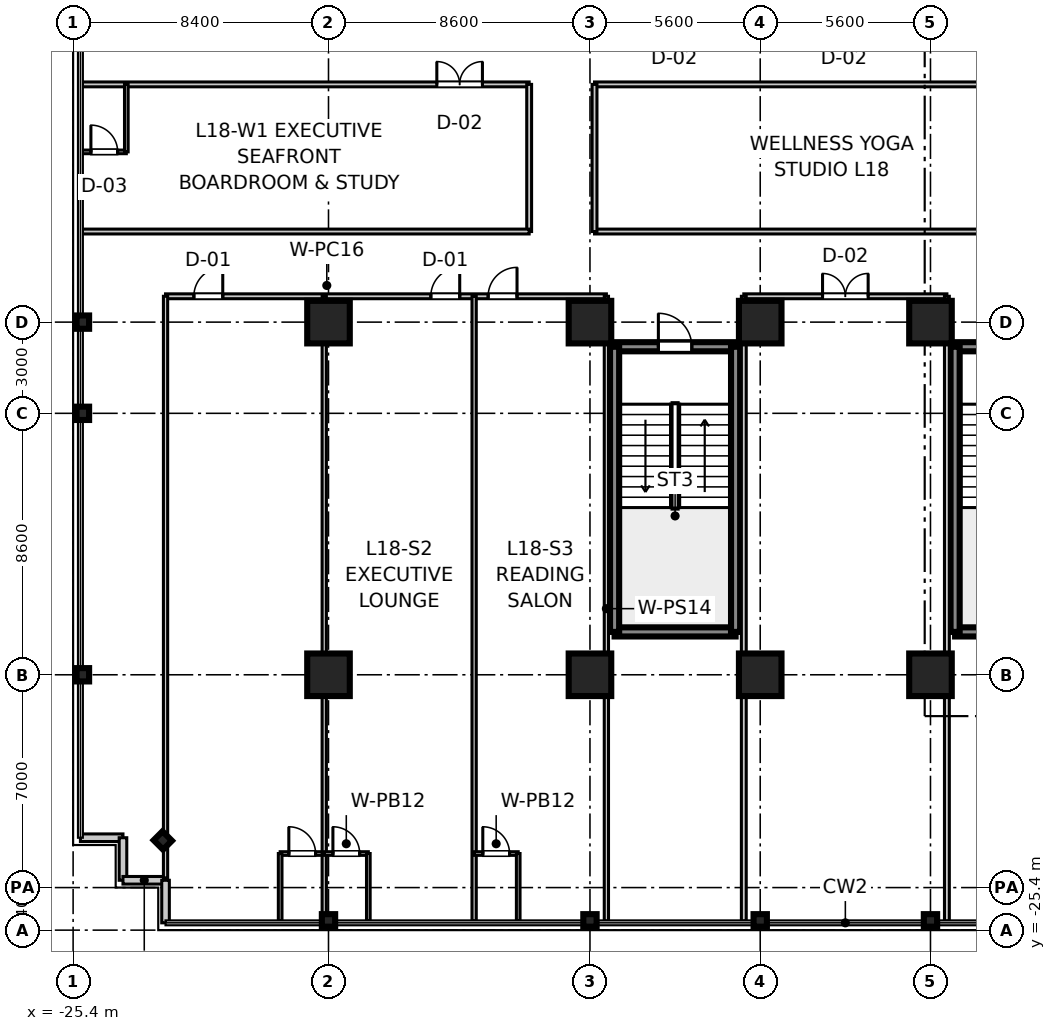
"""IFC4 building model, lengths in metres.
Left out: names, types, materials, properties, quantities, classifications, styles, units other than length and angle.
Written with IfcOpenShell. Run it as: python <this file> out.ifc"""

import sys

from ifc_helpers import new_model, si_unit, direction, frame, frame_2d, origin, origin_2d, place, context, subcontext, project, spatial, rectangle, i_section, extrude, source, transform, mapped, element, fill, save


model = new_model("IFC4")
c1 = context("Model", 3, precision=1e-05, world=origin(), true_north=direction((0.0, 1.0)))
c2 = subcontext(c1, "Body", "Model", "MODEL_VIEW")
j1 = project(units=[si_unit("LENGTHUNIT", "METRE"), si_unit("PLANEANGLEUNIT", "RADIAN")], contexts=[c1])
p1 = place(None, origin())
s1 = spatial("IfcSite", under=j1, at=p1, CompositionType="ELEMENT")
p2 = place(p1, origin())
s2 = spatial("IfcBuilding", under=s1, at=p2, CompositionType="ELEMENT")
p3 = place(p2, frame((0.0, 0.0, 76.2)))
s3 = spatial("IfcBuildingStorey", under=s2, at=p3, CompositionType="ELEMENT", Elevation=76.2)
m1 = source(origin(), c2, "Body", "SweptSolid", [
    extrude(rectangle(XDim=1.4, YDim=1.4, at=origin_2d()), origin(), (0.0, 0.0, 1.0), 3.605),
])
for number, where, z_axis, x_axis in (
    (1, (-17.0, -17.0, 0.0), (0.0, 0.0, 1.0), (1.0, 0.0, 0.0)),
    (2, (-17.0, -5.4, 0.0), (0.0, 0.0, 1.0), (1.0, 0.0, 0.0)),
    (3, (-8.4, -17.0, 0.0), (0.0, 0.0, 1.0), (1.0, 0.0, 0.0)),
    (4, (-8.4, -5.4, 0.0), (0.0, 0.0, 1.0), (1.0, 0.0, 0.0)),
    (5, (-2.8, -17.0, 0.0), (0.0, 0.0, 1.0), (1.0, 0.0, 0.0)),
    (6, (-2.8, -5.4, 0.0), (0.0, 0.0, 1.0), (1.0, 0.0, 0.0)),
    (7, (2.8, -17.0, 0.0), (0.0, 0.0, 1.0), (1.0, 0.0, 0.0)),
    (8, (2.8, -5.4, 0.0), (0.0, 0.0, 1.0), (1.0, 0.0, 0.0)),
):
    element("IfcColumn", number, at=place(p3, frame(where, z_axis=z_axis, x_axis=x_axis)), inside=s3, PredefinedType="COLUMN", context=c2, shape_type="MappedRepresentation", body=[
        mapped(m1, transform((0.0, 0.0, 0.0), scale=1.0)),
    ])
m2 = source(origin(), c2, "Body", "SweptSolid", [
    extrude(i_section(OverallWidth=0.412, OverallDepth=0.438, WebThickness=0.023, FlangeThickness=0.036, at=origin_2d()), origin(), (0.0, 0.0, 1.0), 3.505),
])
for number, where, z_axis, x_axis in (
    (9, (-25.08, -17.0, 0.0), (0.0, 0.0, 1.0), (1.0, 0.0, 0.0)),
    (10, (-25.08, -8.4, 0.0), (0.0, 0.0, 1.0), (1.0, 0.0, 0.0)),
    (11, (-25.08, -5.4, 0.0), (0.0, 0.0, 1.0), (1.0, 0.0, 0.0)),
    (12, (-17.0, -25.08, 0.0), (0.0, 0.0, 1.0), (0.0, 1.0, 0.0)),
    (13, (-8.4, -25.08, 0.0), (0.0, 0.0, 1.0), (0.0, 1.0, 0.0)),
    (14, (-2.8, -25.08, 0.0), (0.0, 0.0, 1.0), (0.0, 1.0, 0.0)),
    (15, (2.8, -25.08, 0.0), (0.0, 0.0, 1.0), (0.0, 1.0, 0.0)),
    (16, (-22.45, -22.45, 0.0), (0.0, 0.0, 1.0), (0.707, 0.707, 0.0)),
):
    element("IfcColumn", number, at=place(p3, frame(where, z_axis=z_axis, x_axis=x_axis)), inside=s3, PredefinedType="COLUMN", context=c2, shape_type="MappedRepresentation", body=[
        mapped(m2, transform((0.0, 0.0, 0.0), scale=1.0)),
    ])
m3 = source(origin(), c2, "Body", "SweptSolid", [
    extrude(rectangle(XDim=3.98, YDim=0.3, at=frame_2d((1.99, 0.0))), origin(), (0.0, 0.0, 1.0), 3.37),
])
for number, where, z_axis, x_axis in (
    (17, (3.61, -15.59, 0.0), (0.0, 0.0, 1.0), (1.0, 0.0, 0.0)),
    (18, (3.61, -6.21, 0.0), (0.0, 0.0, 1.0), (1.0, 0.0, 0.0)),
):
    element("IfcWall", number, at=place(p3, frame(where, z_axis=z_axis, x_axis=x_axis)), inside=s3, PredefinedType="SHEAR", context=c2, shape_type="MappedRepresentation", body=[
        mapped(m3, transform((0.0, 0.0, 0.0), scale=1.0)),
    ])
m4 = source(origin(), c2, "Body", "SweptSolid", [
    extrude(rectangle(XDim=9.38, YDim=0.3, at=frame_2d((4.69, 0.0))), origin(), (0.0, 0.0, 1.0), 3.37),
])
p4 = place(p3, frame((3.61, -15.59, 0.0), z_axis=(0.0, 0.0, 1.0), x_axis=(0.0, 1.0, 0.0)))
e19 = element("IfcWall", 19, at=p4, inside=s3, PredefinedType="SHEAR", context=c2, shape_type="MappedRepresentation", body=[
    mapped(m4, transform((0.0, 0.0, 0.0), scale=1.0)),
])
p5 = place(p3, frame((-7.59, -15.59, 0.0), z_axis=(0.0, 0.0, 1.0), x_axis=(1.0, 0.0, 0.0)))
e20 = element("IfcWall", 20, at=p5, inside=s3, PredefinedType="SHEAR", context=c2, shape_type="MappedRepresentation", body=[
    mapped(m3, transform((0.0, 0.0, 0.0), scale=1.0)),
])
p6 = place(p3, frame((-7.59, -6.21, 0.0), z_axis=(0.0, 0.0, 1.0), x_axis=(1.0, 0.0, 0.0)))
e21 = element("IfcWall", 21, at=p6, inside=s3, PredefinedType="SHEAR", context=c2, shape_type="MappedRepresentation", body=[
    mapped(m3, transform((0.0, 0.0, 0.0), scale=1.0)),
])
p7 = place(p6, frame((1.44, 0.0, 0.0)))
e22 = element("IfcOpeningElement", 22, at=p7, cuts=e21, PredefinedType="OPENING", context=c2, shape_type="SweptSolid", body=[
    extrude(rectangle(XDim=1.1, YDim=2.15, at=frame_2d((0.55, 1.075))), frame((0.0, 0.16, 0.0), z_axis=(0.0, -1.0, 0.0), x_axis=(1.0, 0.0, 0.0)), (0.0, 0.0, 1.0), 0.32),
])
for number, where, z_axis, x_axis in (
    (23, (-7.59, -15.59, 0.0), (0.0, 0.0, 1.0), (0.0, 1.0, 0.0)),
    (24, (-3.61, -15.59, 0.0), (0.0, 0.0, 1.0), (0.0, 1.0, 0.0)),
):
    element("IfcWall", number, at=place(p3, frame(where, z_axis=z_axis, x_axis=x_axis)), inside=s3, PredefinedType="SHEAR", context=c2, shape_type="MappedRepresentation", body=[
        mapped(m4, transform((0.0, 0.0, 0.0), scale=1.0)),
    ])
m5 = source(origin(), c2, "Body", "SweptSolid", [
    extrude(rectangle(XDim=1.4, YDim=0.25, at=frame_2d((0.7, 0.0))), origin(), (0.0, 0.0, 1.0), 3.37),
])
for number, where, z_axis, x_axis in (
    (25, (-25.16, -22.36, 0.0), (0.0, 0.0, 1.0), (1.0, 0.0, 0.0)),
    (26, (-23.76, -23.76, 0.0), (0.0, 0.0, 1.0), (0.0, 1.0, 0.0)),
    (27, (-23.76, -23.76, 0.0), (0.0, 0.0, 1.0), (1.0, 0.0, 0.0)),
    (28, (-22.36, -25.16, 0.0), (0.0, 0.0, 1.0), (0.0, 1.0, 0.0)),
):
    element("IfcWall", number, at=place(p3, frame(where, z_axis=z_axis, x_axis=x_axis)), inside=s3, PredefinedType="STANDARD", context=c2, shape_type="MappedRepresentation", body=[
        mapped(m5, transform((0.0, 0.0, 0.0), scale=1.0)),
    ])
m6 = source(origin(), c2, "Body", "SweptSolid", [
    extrude(rectangle(XDim=14.5, YDim=0.16, at=frame_2d((7.25, 0.0))), origin(), (0.0, 0.0, 1.0), 2.71),
])
p8 = place(p3, frame((-22.36, -4.55, 0.0), z_axis=(0.0, 0.0, 1.0), x_axis=(1.0, 0.0, 0.0)))
e29 = element("IfcWall", 29, at=p8, inside=s3, PredefinedType="PARTITIONING", context=c2, shape_type="MappedRepresentation", body=[
    mapped(m6, transform((0.0, 0.0, 0.0), scale=1.0)),
])
p9 = place(p8, frame((0.932, 0.0, 0.0)))
e30 = element("IfcOpeningElement", 30, at=p9, cuts=e29, PredefinedType="OPENING", context=c2, shape_type="SweptSolid", body=[
    extrude(rectangle(XDim=0.95, YDim=2.1, at=frame_2d((0.475, 1.05))), frame((0.0, 0.09, 0.0), z_axis=(0.0, -1.0, 0.0), x_axis=(1.0, 0.0, 0.0)), (0.0, 0.0, 1.0), 0.18),
])
p10 = place(p8, frame((8.726, 0.0, 0.0)))
e31 = element("IfcOpeningElement", 31, at=p10, cuts=e29, PredefinedType="OPENING", context=c2, shape_type="SweptSolid", body=[
    extrude(rectangle(XDim=0.95, YDim=2.1, at=frame_2d((0.475, 1.05))), frame((0.0, 0.09, 0.0), z_axis=(0.0, -1.0, 0.0), x_axis=(1.0, 0.0, 0.0)), (0.0, 0.0, 1.0), 0.18),
])
p11 = place(p8, frame((10.611, 0.0, 0.0)))
e32 = element("IfcOpeningElement", 32, at=p11, cuts=e29, PredefinedType="OPENING", context=c2, shape_type="SweptSolid", body=[
    extrude(rectangle(XDim=0.95, YDim=2.1, at=frame_2d((0.475, 1.05))), frame((0.0, 0.09, 0.0), z_axis=(0.0, -1.0, 0.0), x_axis=(1.0, 0.0, 0.0)), (0.0, 0.0, 1.0), 0.18),
])
m7 = source(origin(), c2, "Body", "SweptSolid", [
    extrude(rectangle(XDim=19.13, YDim=0.14, at=frame_2d((9.565, 0.0))), origin(), (0.0, 0.0, 1.0), 2.71),
])
p12 = place(p3, frame((-22.36, -23.68, 0.0), z_axis=(0.0, 0.0, 1.0), x_axis=(0.0, 1.0, 0.0)))
e33 = element("IfcWall", 33, at=p12, inside=s3, PredefinedType="PARTITIONING", context=c2, shape_type="MappedRepresentation", body=[
    mapped(m7, transform((0.0, 0.0, 0.0), scale=1.0)),
])
m8 = source(origin(), c2, "Body", "SweptSolid", [
    extrude(rectangle(XDim=20.55, YDim=0.14, at=frame_2d((10.275, 0.0))), origin(), (0.0, 0.0, 1.0), 2.71),
])
p13 = place(p3, frame((-7.86, -25.1, 0.0), z_axis=(0.0, 0.0, 1.0), x_axis=(0.0, 1.0, 0.0)))
e34 = element("IfcWall", 34, at=p13, inside=s3, PredefinedType="PARTITIONING", context=c2, shape_type="MappedRepresentation", body=[
    mapped(m8, transform((0.0, 0.0, 0.0), scale=1.0)),
])
m9 = source(origin(), c2, "Body", "SweptSolid", [
    extrude(rectangle(XDim=1.45, YDim=0.12, at=frame_2d((0.725, 0.0))), origin(), (0.0, 0.0, 1.0), 2.71),
])
p14 = place(p3, frame((-18.59, -22.88, 0.0), z_axis=(0.0, 0.0, 1.0), x_axis=(1.0, 0.0, 0.0)))
e35 = element("IfcWall", 35, at=p14, inside=s3, PredefinedType="PARTITIONING", context=c2, shape_type="MappedRepresentation", body=[
    mapped(m9, transform((0.0, 0.0, 0.0), scale=1.0)),
])
p15 = place(p14, frame((0.285, 0.0, 0.0)))
e36 = element("IfcOpeningElement", 36, at=p15, cuts=e35, PredefinedType="OPENING", context=c2, shape_type="SweptSolid", body=[
    extrude(rectangle(XDim=0.88, YDim=2.1, at=frame_2d((0.44, 1.05))), frame((0.0, 0.07, 0.0), z_axis=(0.0, -1.0, 0.0), x_axis=(1.0, 0.0, 0.0)), (0.0, 0.0, 1.0), 0.14),
])
m10 = source(origin(), c2, "Body", "SweptSolid", [
    extrude(rectangle(XDim=2.22, YDim=0.12, at=frame_2d((1.11, 0.0))), origin(), (0.0, 0.0, 1.0), 2.71),
])
p16 = place(p3, frame((-18.59, -25.1, 0.0), z_axis=(0.0, 0.0, 1.0), x_axis=(0.0, 1.0, 0.0)))
e37 = element("IfcWall", 37, at=p16, inside=s3, PredefinedType="PARTITIONING", context=c2, shape_type="MappedRepresentation", body=[
    mapped(m10, transform((0.0, 0.0, 0.0), scale=1.0)),
])
p17 = place(p3, frame((-17.14, -25.1, 0.0), z_axis=(0.0, 0.0, 1.0), x_axis=(0.0, 1.0, 0.0)))
e38 = element("IfcWall", 38, at=p17, inside=s3, PredefinedType="PARTITIONING", context=c2, shape_type="MappedRepresentation", body=[
    mapped(m8, transform((0.0, 0.0, 0.0), scale=1.0)),
])
m11 = source(origin(), c2, "Body", "SweptSolid", [
    extrude(rectangle(XDim=1.45, YDim=0.12, at=frame_2d((0.725, 0.0))), origin(), (0.0, 0.0, 1.0), 2.71),
])
p18 = place(p3, frame((-17.14, -22.88, 0.0), z_axis=(0.0, 0.0, 1.0), x_axis=(1.0, 0.0, 0.0)))
e39 = element("IfcWall", 39, at=p18, inside=s3, PredefinedType="PARTITIONING", context=c2, shape_type="MappedRepresentation", body=[
    mapped(m11, transform((0.0, 0.0, 0.0), scale=1.0)),
])
p19 = place(p18, frame((0.285, 0.0, 0.0)))
e40 = element("IfcOpeningElement", 40, at=p19, cuts=e39, PredefinedType="OPENING", context=c2, shape_type="SweptSolid", body=[
    extrude(rectangle(XDim=0.88, YDim=2.1, at=frame_2d((0.44, 1.05))), frame((0.0, 0.07, 0.0), z_axis=(0.0, -1.0, 0.0), x_axis=(1.0, 0.0, 0.0)), (0.0, 0.0, 1.0), 0.14),
])
p20 = place(p3, frame((-15.69, -25.1, 0.0), z_axis=(0.0, 0.0, 1.0), x_axis=(0.0, 1.0, 0.0)))
e41 = element("IfcWall", 41, at=p20, inside=s3, PredefinedType="PARTITIONING", context=c2, shape_type="MappedRepresentation", body=[
    mapped(m10, transform((0.0, 0.0, 0.0), scale=1.0)),
])
p21 = place(p3, frame((-12.21, -25.1, 0.0), z_axis=(0.0, 0.0, 1.0), x_axis=(0.0, 1.0, 0.0)))
e42 = element("IfcWall", 42, at=p21, inside=s3, PredefinedType="PARTITIONING", context=c2, shape_type="MappedRepresentation", body=[
    mapped(m8, transform((0.0, 0.0, 0.0), scale=1.0)),
])
p22 = place(p3, frame((-12.21, -22.88, 0.0), z_axis=(0.0, 0.0, 1.0), x_axis=(1.0, 0.0, 0.0)))
e43 = element("IfcWall", 43, at=p22, inside=s3, PredefinedType="PARTITIONING", context=c2, shape_type="MappedRepresentation", body=[
    mapped(m11, transform((0.0, 0.0, 0.0), scale=1.0)),
])
p23 = place(p22, frame((0.285, 0.0, 0.0)))
e44 = element("IfcOpeningElement", 44, at=p23, cuts=e43, PredefinedType="OPENING", context=c2, shape_type="SweptSolid", body=[
    extrude(rectangle(XDim=0.88, YDim=2.1, at=frame_2d((0.44, 1.05))), frame((0.0, 0.07, 0.0), z_axis=(0.0, -1.0, 0.0), x_axis=(1.0, 0.0, 0.0)), (0.0, 0.0, 1.0), 0.14),
])
p24 = place(p3, frame((-10.76, -25.1, 0.0), z_axis=(0.0, 0.0, 1.0), x_axis=(0.0, 1.0, 0.0)))
e45 = element("IfcWall", 45, at=p24, inside=s3, PredefinedType="PARTITIONING", context=c2, shape_type="MappedRepresentation", body=[
    mapped(m10, transform((0.0, 0.0, 0.0), scale=1.0)),
])
m12 = source(origin(), c2, "Body", "SweptSolid", [
    extrude(rectangle(XDim=6.68, YDim=0.16, at=frame_2d((3.34, 0.0))), origin(), (0.0, 0.0, 1.0), 2.71),
])
p25 = place(p3, frame((-3.34, -4.55, 0.0), z_axis=(0.0, 0.0, 1.0), x_axis=(1.0, 0.0, 0.0)))
e46 = element("IfcWall", 46, at=p25, inside=s3, PredefinedType="PARTITIONING", context=c2, shape_type="MappedRepresentation", body=[
    mapped(m12, transform((0.0, 0.0, 0.0), scale=1.0)),
])
p26 = place(p25, frame((2.59, 0.0, 0.0)))
e47 = element("IfcOpeningElement", 47, at=p26, cuts=e46, PredefinedType="OPENING", context=c2, shape_type="SweptSolid", body=[
    extrude(rectangle(XDim=1.5, YDim=2.15, at=frame_2d((0.75, 1.075))), frame((0.0, 0.09, 0.0), z_axis=(0.0, -1.0, 0.0), x_axis=(1.0, 0.0, 0.0)), (0.0, 0.0, 1.0), 0.18),
])
m13 = source(origin(), c2, "Body", "SweptSolid", [
    extrude(rectangle(XDim=20.55, YDim=0.16, at=frame_2d((10.275, 0.0))), origin(), (0.0, 0.0, 1.0), 2.71),
])
for number, where, z_axis, x_axis in (
    (48, (-3.34, -25.1, 0.0), (0.0, 0.0, 1.0), (0.0, 1.0, 0.0)),
    (49, (3.34, -25.1, 0.0), (0.0, 0.0, 1.0), (0.0, 1.0, 0.0)),
):
    element("IfcWall", number, at=place(p3, frame(where, z_axis=z_axis, x_axis=x_axis)), inside=s3, PredefinedType="PARTITIONING", context=c2, shape_type="MappedRepresentation", body=[
        mapped(m13, transform((0.0, 0.0, 0.0), scale=1.0)),
    ])
m14 = source(origin(), c2, "Body", "SweptSolid", [
    extrude(rectangle(XDim=14.7, YDim=0.16, at=frame_2d((7.35, 0.0))), origin(), (0.0, 0.0, 1.0), 2.71),
])
p27 = place(p3, frame((-25.1, 2.42, 0.0), z_axis=(0.0, 0.0, 1.0), x_axis=(1.0, 0.0, 0.0)))
e50 = element("IfcWall", 50, at=p27, inside=s3, PredefinedType="PARTITIONING", context=c2, shape_type="MappedRepresentation", body=[
    mapped(m14, transform((0.0, 0.0, 0.0), scale=1.0)),
])
p28 = place(p27, frame((11.663, 0.0, 0.0)))
e51 = element("IfcOpeningElement", 51, at=p28, cuts=e50, PredefinedType="OPENING", context=c2, shape_type="SweptSolid", body=[
    extrude(rectangle(XDim=1.5, YDim=2.15, at=frame_2d((0.75, 1.075))), frame((0.0, 0.09, 0.0), z_axis=(0.0, -1.0, 0.0), x_axis=(1.0, 0.0, 0.0)), (0.0, 0.0, 1.0), 0.18),
])
m15 = source(origin(), c2, "Body", "SweptSolid", [
    extrude(rectangle(XDim=4.84, YDim=0.16, at=frame_2d((2.42, 0.0))), origin(), (0.0, 0.0, 1.0), 2.71),
])
p29 = place(p3, frame((-10.4, -2.42, 0.0), z_axis=(0.0, 0.0, 1.0), x_axis=(0.0, 1.0, 0.0)))
e52 = element("IfcWall", 52, at=p29, inside=s3, PredefinedType="PARTITIONING", context=c2, shape_type="MappedRepresentation", body=[
    mapped(m15, transform((0.0, 0.0, 0.0), scale=1.0)),
])
p30 = place(p3, frame((-25.1, -2.42, 0.0), z_axis=(0.0, 0.0, 1.0), x_axis=(1.0, 0.0, 0.0)))
e53 = element("IfcWall", 53, at=p30, inside=s3, PredefinedType="PARTITIONING", context=c2, shape_type="MappedRepresentation", body=[
    mapped(m14, transform((0.0, 0.0, 0.0), scale=1.0)),
])
p31 = place(p3, frame((-25.1, 0.2, 0.0), z_axis=(0.0, 0.0, 1.0), x_axis=(1.0, 0.0, 0.0)))
e54 = element("IfcWall", 54, at=p31, inside=s3, PredefinedType="PARTITIONING", context=c2, shape_type="MappedRepresentation", body=[
    mapped(m9, transform((0.0, 0.0, 0.0), scale=1.0)),
])
p32 = place(p31, frame((0.285, 0.0, 0.0)))
e55 = element("IfcOpeningElement", 55, at=p32, cuts=e54, PredefinedType="OPENING", context=c2, shape_type="SweptSolid", body=[
    extrude(rectangle(XDim=0.88, YDim=2.1, at=frame_2d((0.44, 1.05))), frame((0.0, 0.07, 0.0), z_axis=(0.0, -1.0, 0.0), x_axis=(1.0, 0.0, 0.0)), (0.0, 0.0, 1.0), 0.14),
])
m16 = source(origin(), c2, "Body", "SweptSolid", [
    extrude(rectangle(XDim=2.22, YDim=0.12, at=frame_2d((1.11, 0.0))), origin(), (0.0, 0.0, 1.0), 2.71),
])
p33 = place(p3, frame((-23.65, 0.2, 0.0), z_axis=(0.0, 0.0, 1.0), x_axis=(0.0, 1.0, 0.0)))
e56 = element("IfcWall", 56, at=p33, inside=s3, PredefinedType="PARTITIONING", context=c2, shape_type="MappedRepresentation", body=[
    mapped(m16, transform((0.0, 0.0, 0.0), scale=1.0)),
])
m17 = source(origin(), c2, "Body", "SweptSolid", [
    extrude(rectangle(XDim=15.6, YDim=0.16, at=frame_2d((7.8, 0.0))), origin(), (0.0, 0.0, 1.0), 2.71),
])
p34 = place(p3, frame((-8.25, -2.42, 0.0), z_axis=(0.0, 0.0, 1.0), x_axis=(1.0, 0.0, 0.0)))
e57 = element("IfcWall", 57, at=p34, inside=s3, PredefinedType="PARTITIONING", context=c2, shape_type="MappedRepresentation", body=[
    mapped(m17, transform((0.0, 0.0, 0.0), scale=1.0)),
])
p35 = place(p3, frame((-8.25, 2.42, 0.0), z_axis=(0.0, 0.0, 1.0), x_axis=(1.0, 0.0, 0.0)))
e58 = element("IfcWall", 58, at=p35, inside=s3, PredefinedType="PARTITIONING", context=c2, shape_type="MappedRepresentation", body=[
    mapped(m17, transform((0.0, 0.0, 0.0), scale=1.0)),
])
p36 = place(p35, frame((13.067, 0.0, 0.0)))
e59 = element("IfcOpeningElement", 59, at=p36, cuts=e58, PredefinedType="OPENING", context=c2, shape_type="SweptSolid", body=[
    extrude(rectangle(XDim=1.5, YDim=2.15, at=frame_2d((0.75, 1.075))), frame((0.0, 0.09, 0.0), z_axis=(0.0, -1.0, 0.0), x_axis=(1.0, 0.0, 0.0)), (0.0, 0.0, 1.0), 0.18),
])
p37 = place(p3, frame((-8.25, -2.42, 0.0), z_axis=(0.0, 0.0, 1.0), x_axis=(0.0, 1.0, 0.0)))
e60 = element("IfcWall", 60, at=p37, inside=s3, PredefinedType="PARTITIONING", context=c2, shape_type="MappedRepresentation", body=[
    mapped(m15, transform((0.0, 0.0, 0.0), scale=1.0)),
])
m18 = source(origin(), c2, "Body", "SweptSolid", [
    extrude(rectangle(XDim=1.1, YDim=2.15, at=frame_2d((0.55, 1.075))), frame((0.0, 0.025, 0.0), z_axis=(0.0, -1.0, 0.0), x_axis=(1.0, 0.0, 0.0)), (0.0, 0.0, 1.0), 0.05),
])
p38 = place(p7, frame((1.1, 0.0, 0.0), z_axis=(0.0, 0.0, 1.0), x_axis=(-1.0, 0.0, 0.0)))
e61 = element("IfcDoor", 61, at=p38, inside=s3, OperationType="SINGLE_SWING_LEFT", PredefinedType="DOOR", context=c2, shape_type="MappedRepresentation", body=[
    mapped(m18, transform((0.0, 0.0, 0.0), scale=1.0)),
])
fill(e22, e61)
m19 = source(origin(), c2, "Body", "SweptSolid", [
    extrude(rectangle(XDim=0.88, YDim=2.1, at=frame_2d((0.44, 1.05))), frame((0.0, 0.025, 0.0), z_axis=(0.0, -1.0, 0.0), x_axis=(1.0, 0.0, 0.0)), (0.0, 0.0, 1.0), 0.05),
])
p39 = place(p15, frame((0.88, 0.0, 0.0), z_axis=(0.0, 0.0, 1.0), x_axis=(-1.0, 0.0, 0.0)))
e62 = element("IfcDoor", 62, at=p39, inside=s3, OperationType="SINGLE_SWING_LEFT", PredefinedType="DOOR", context=c2, shape_type="MappedRepresentation", body=[
    mapped(m19, transform((0.0, 0.0, 0.0), scale=1.0)),
])
fill(e36, e62)
m20 = source(origin(), c2, "Body", "SweptSolid", [
    extrude(rectangle(XDim=0.95, YDim=2.1, at=frame_2d((0.475, 1.05))), frame((0.0, 0.025, 0.0), z_axis=(0.0, -1.0, 0.0), x_axis=(1.0, 0.0, 0.0)), (0.0, 0.0, 1.0), 0.05),
])
p40 = place(p9, frame((0.95, 0.0, 0.0), z_axis=(0.0, 0.0, 1.0), x_axis=(-1.0, 0.0, 0.0)))
e63 = element("IfcDoor", 63, at=p40, inside=s3, OperationType="SINGLE_SWING_RIGHT", PredefinedType="DOOR", context=c2, shape_type="MappedRepresentation", body=[
    mapped(m20, transform((0.0, 0.0, 0.0), scale=1.0)),
])
fill(e30, e63)
p41 = place(p19, frame((0.88, 0.0, 0.0), z_axis=(0.0, 0.0, 1.0), x_axis=(-1.0, 0.0, 0.0)))
e64 = element("IfcDoor", 64, at=p41, inside=s3, OperationType="SINGLE_SWING_LEFT", PredefinedType="DOOR", context=c2, shape_type="MappedRepresentation", body=[
    mapped(m19, transform((0.0, 0.0, 0.0), scale=1.0)),
])
fill(e40, e64)
p42 = place(p10, frame((0.95, 0.0, 0.0), z_axis=(0.0, 0.0, 1.0), x_axis=(-1.0, 0.0, 0.0)))
e65 = element("IfcDoor", 65, at=p42, inside=s3, OperationType="SINGLE_SWING_RIGHT", PredefinedType="DOOR", context=c2, shape_type="MappedRepresentation", body=[
    mapped(m20, transform((0.0, 0.0, 0.0), scale=1.0)),
])
fill(e31, e65)
p43 = place(p23, frame((0.88, 0.0, 0.0), z_axis=(0.0, 0.0, 1.0), x_axis=(-1.0, 0.0, 0.0)))
e66 = element("IfcDoor", 66, at=p43, inside=s3, OperationType="SINGLE_SWING_LEFT", PredefinedType="DOOR", context=c2, shape_type="MappedRepresentation", body=[
    mapped(m19, transform((0.0, 0.0, 0.0), scale=1.0)),
])
fill(e44, e66)
p44 = place(p11, frame((0.95, 0.0, 0.0), z_axis=(0.0, 0.0, 1.0), x_axis=(-1.0, 0.0, 0.0)))
e67 = element("IfcDoor", 67, at=p44, inside=s3, OperationType="SINGLE_SWING_RIGHT", PredefinedType="DOOR", context=c2, shape_type="MappedRepresentation", body=[
    mapped(m20, transform((0.0, 0.0, 0.0), scale=1.0)),
])
fill(e32, e67)
m21 = source(origin(), c2, "Body", "SweptSolid", [
    extrude(rectangle(XDim=1.5, YDim=2.15, at=frame_2d((0.75, 1.075))), frame((0.0, 0.025, 0.0), z_axis=(0.0, -1.0, 0.0), x_axis=(1.0, 0.0, 0.0)), (0.0, 0.0, 1.0), 0.05),
])
p45 = place(p26, frame((1.5, 0.0, 0.0), z_axis=(0.0, 0.0, 1.0), x_axis=(-1.0, 0.0, 0.0)))
e68 = element("IfcDoor", 68, at=p45, inside=s3, OperationType="DOUBLE_DOOR_SINGLE_SWING", PredefinedType="DOOR", context=c2, shape_type="MappedRepresentation", body=[
    mapped(m21, transform((0.0, 0.0, 0.0), scale=1.0)),
])
fill(e47, e68)
p46 = place(p32, origin())
e69 = element("IfcDoor", 69, at=p46, inside=s3, OperationType="SINGLE_SWING_LEFT", PredefinedType="DOOR", context=c2, shape_type="MappedRepresentation", body=[
    mapped(m19, transform((0.0, 0.0, 0.0), scale=1.0)),
])
fill(e55, e69)
p47 = place(p28, origin())
e70 = element("IfcDoor", 70, at=p47, inside=s3, OperationType="DOUBLE_DOOR_SINGLE_SWING", PredefinedType="DOOR", context=c2, shape_type="MappedRepresentation", body=[
    mapped(m21, transform((0.0, 0.0, 0.0), scale=1.0)),
])
fill(e51, e70)
save(model, sys.argv[1])
